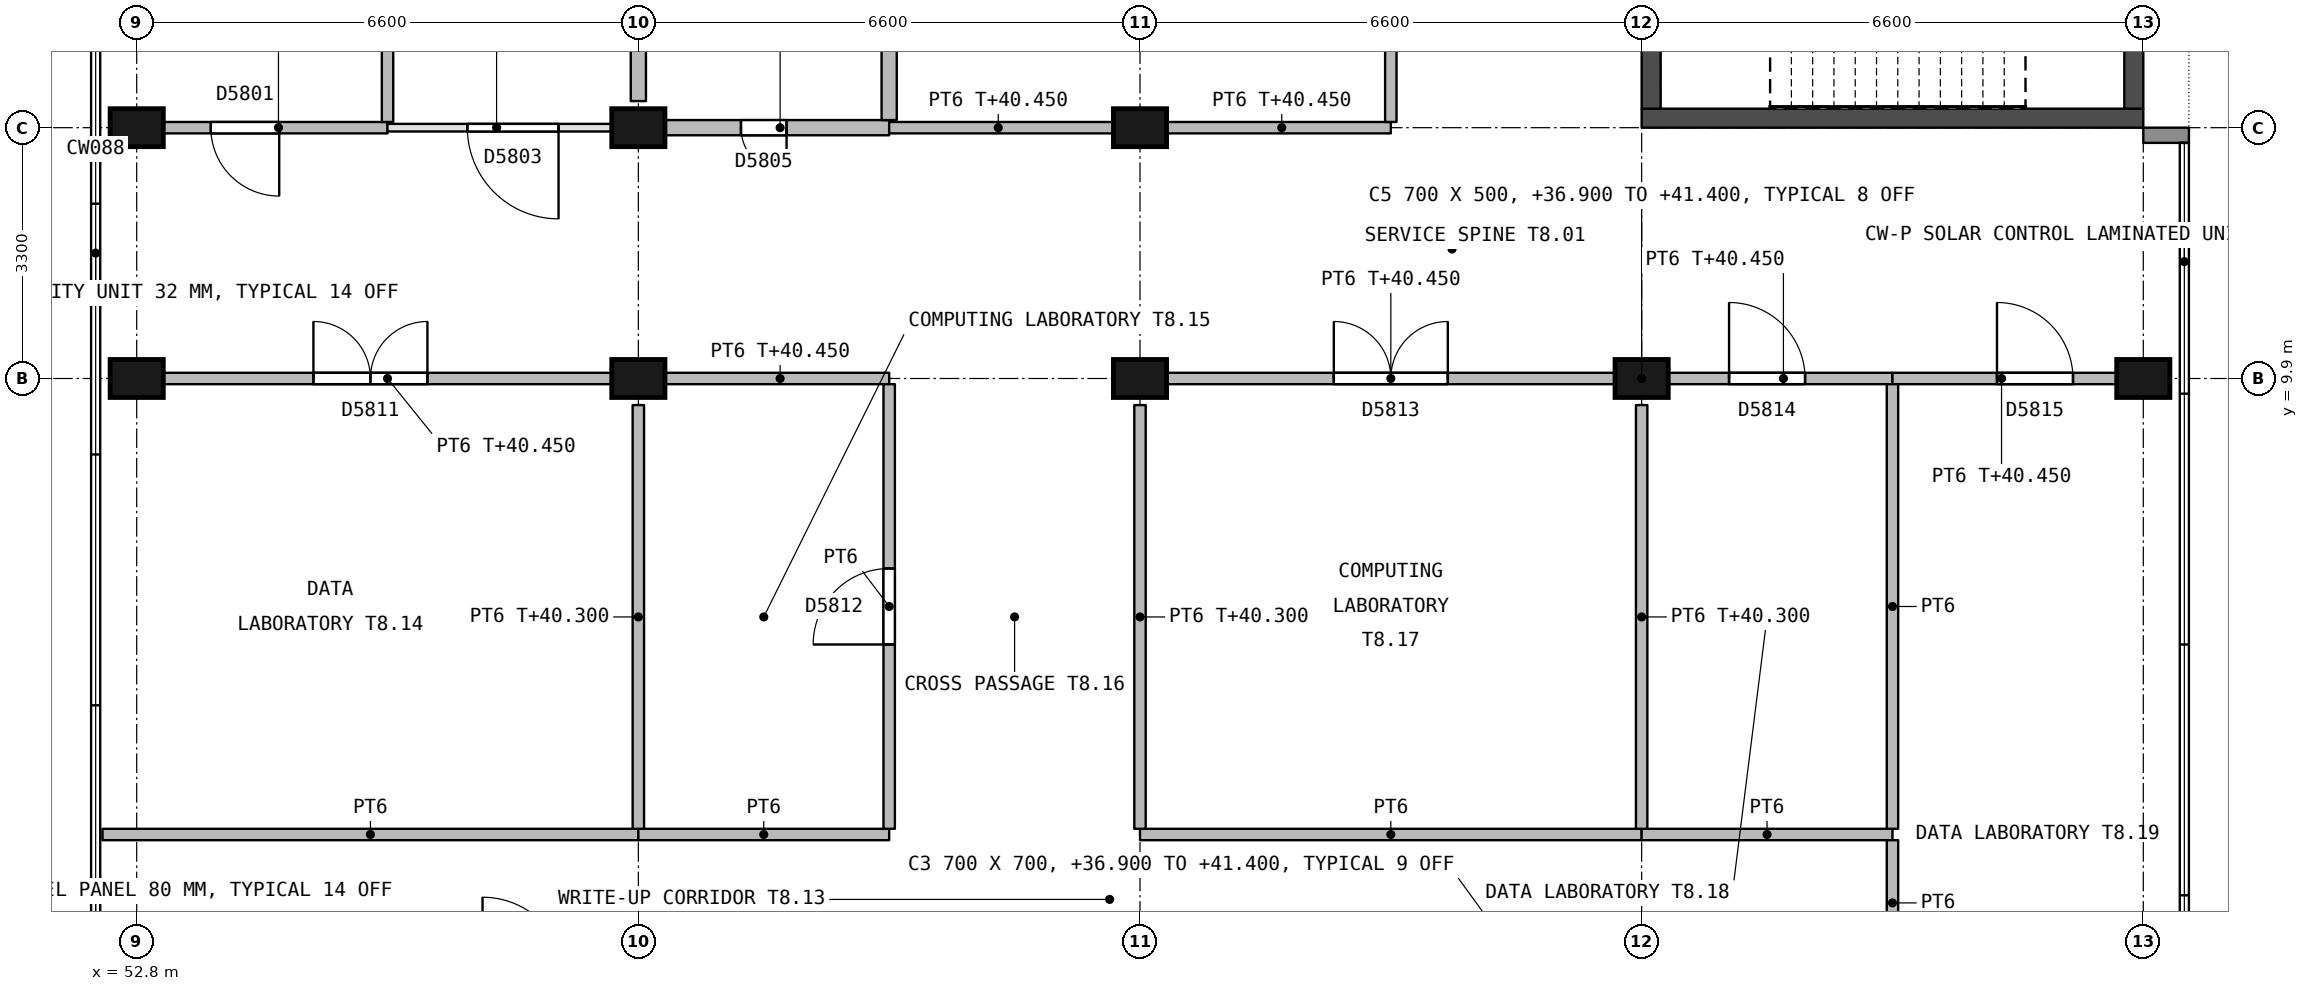
"""IFC4 building model, lengths in metres.
Left out: names, types, materials, properties, quantities, classifications, styles, units other than length and angle.
Written with IfcOpenShell. Run it as: python <this file> out.ifc"""

import sys

from ifc_helpers import new_model, si_unit, direction, frame, frame_2d, origin, origin_2d, place, context, subcontext, project, spatial, rectangle, extrude, element, fill, save


model = new_model("IFC4")
c1 = context("Model", 3, precision=1e-05, world=origin(), true_north=direction((0.0, 1.0)))
c2 = subcontext(c1, "Body", "Model", "MODEL_VIEW")
j1 = project(units=[si_unit("LENGTHUNIT", "METRE"), si_unit("PLANEANGLEUNIT", "RADIAN")], contexts=[c1])
p1 = place(None, origin())
s1 = spatial("IfcSite", under=j1, at=p1, CompositionType="ELEMENT")
p2 = place(p1, origin())
s2 = spatial("IfcBuilding", under=s1, at=p2, CompositionType="ELEMENT")
p3 = place(p2, frame((0.0, 0.0, 36.9)))
s3 = spatial("IfcBuildingStorey", under=s2, at=p3, CompositionType="ELEMENT", Elevation=36.9)
for number, where, z_axis, x_axis in (
    (1, (52.8, 9.9, 0.0), (0.0, 0.0, 1.0), (1.0, 0.0, 0.0)),
    (2, (52.8, 13.2, 0.0), (0.0, 0.0, 1.0), (1.0, 0.0, 0.0)),
    (3, (59.4, 9.9, 0.0), (0.0, 0.0, 1.0), (1.0, 0.0, 0.0)),
    (4, (59.4, 13.2, 0.0), (0.0, 0.0, 1.0), (1.0, 0.0, 0.0)),
    (5, (66.0, 9.9, 0.0), (0.0, 0.0, 1.0), (1.0, 0.0, 0.0)),
    (6, (66.0, 13.2, 0.0), (0.0, 0.0, 1.0), (1.0, 0.0, 0.0)),
    (7, (72.6, 9.9, 0.0), (0.0, 0.0, 1.0), (1.0, 0.0, 0.0)),
    (8, (79.2, 9.9, 0.0), (0.0, 0.0, 1.0), (1.0, 0.0, 0.0)),
):
    element("IfcColumn", number, at=place(p3, frame(where, z_axis=z_axis, x_axis=x_axis)), inside=s3, PredefinedType="COLUMN", context=c2, shape_type="SweptSolid", body=[
        extrude(rectangle(XDim=0.7, YDim=0.5, at=origin_2d()), origin(), (0.0, 0.0, 1.0), 4.5),
    ])
p4 = place(p3, frame((72.6, 13.325, 0.0), z_axis=(0.0, 0.0, 1.0), x_axis=(1.0, 0.0, 0.0)))
e9 = element("IfcWall", 9, at=p4, inside=s3, PredefinedType="SHEAR", context=c2, shape_type="SweptSolid", body=[
    extrude(rectangle(XDim=6.6, YDim=0.25, at=frame_2d((3.3, 0.0))), origin(), (0.0, 0.0, 1.0), 4.2),
])
p5 = place(p3, frame((72.725, 13.45, 0.0), z_axis=(0.0, 0.0, 1.0), x_axis=(0.0, 1.0, 0.0)))
e10 = element("IfcWall", 10, at=p5, inside=s3, PredefinedType="SHEAR", context=c2, shape_type="SweptSolid", body=[
    extrude(rectangle(XDim=9.4, YDim=0.25, at=frame_2d((4.7, 0.0))), origin(), (0.0, 0.0, 1.0), 4.2),
])
p6 = place(p5, frame((4.125, 0.0, 0.0)))
e11 = element("IfcOpeningElement", 11, at=p6, cuts=e10, PredefinedType="OPENING", context=c2, shape_type="SweptSolid", body=[
    extrude(rectangle(XDim=1.2, YDim=2.1, at=frame_2d((0.6, 1.05))), frame((0.0, 0.135, 0.0), z_axis=(0.0, -1.0, 0.0), x_axis=(1.0, 0.0, 0.0)), (0.0, 0.0, 1.0), 0.27),
])
p7 = place(p3, frame((79.075, 13.45, 0.0), z_axis=(0.0, 0.0, 1.0), x_axis=(0.0, 1.0, 0.0)))
e12 = element("IfcWall", 12, at=p7, inside=s3, PredefinedType="SHEAR", context=c2, shape_type="SweptSolid", body=[
    extrude(rectangle(XDim=9.4, YDim=0.25, at=frame_2d((4.7, 0.0))), origin(), (0.0, 0.0, 1.0), 4.2),
])
p8 = place(p7, frame((0.95, 0.0, 0.7)))
e13 = element("IfcOpeningElement", 13, at=p8, cuts=e12, PredefinedType="OPENING", context=c2, shape_type="SweptSolid", body=[
    extrude(rectangle(XDim=1.2, YDim=1.8, at=frame_2d((0.6, 0.9))), frame((0.0, 0.135, 0.0), z_axis=(0.0, -1.0, 0.0), x_axis=(1.0, 0.0, 0.0)), (0.0, 0.0, 1.0), 0.27),
])
p9 = place(p3, frame((79.2, 13.1, 0.0), z_axis=(0.0, 0.0, 1.0), x_axis=(1.0, 0.0, 0.0)))
e14 = element("IfcWall", 14, at=p9, inside=s3, PredefinedType="STANDARD", context=c2, shape_type="SweptSolid", body=[
    extrude(rectangle(XDim=0.6, YDim=0.2, at=frame_2d((0.3, 0.0))), origin(), (0.0, 0.0, 1.0), 3.55),
])
p10 = place(p3, frame((56.1, 13.2, 0.0), z_axis=(0.0, 0.0, 1.0), x_axis=(-1.0, 0.0, 0.0)))
e15 = element("IfcWall", 15, at=p10, inside=s3, PredefinedType="PARTITIONING", context=c2, shape_type="SweptSolid", body=[
    extrude(rectangle(XDim=2.95, YDim=0.15, at=frame_2d((1.475, 0.0))), origin(), (0.0, 0.0, 1.0), 3.55),
])
p11 = place(p10, frame((1.425, 0.0, 0.0)))
e16 = element("IfcOpeningElement", 16, at=p11, cuts=e15, PredefinedType="OPENING", context=c2, shape_type="SweptSolid", body=[
    extrude(rectangle(XDim=0.9, YDim=2.1, at=frame_2d((0.45, 1.05))), frame((0.0, 0.085, 0.0), z_axis=(0.0, -1.0, 0.0), x_axis=(1.0, 0.0, 0.0)), (0.0, 0.0, 1.0), 0.17),
])
p12 = place(p3, frame((56.1, 13.2, 0.0), z_axis=(0.0, 0.0, 1.0), x_axis=(1.0, 0.0, 0.0)))
e17 = element("IfcWall", 17, at=p12, inside=s3, PredefinedType="PARTITIONING", context=c2, shape_type="SweptSolid", body=[
    extrude(rectangle(XDim=2.95, YDim=0.1, at=frame_2d((1.475, 0.0))), origin(), (0.0, 0.0, 1.0), 3.55),
])
p13 = place(p12, frame((1.05, 0.0, 0.0)))
e18 = element("IfcOpeningElement", 18, at=p13, cuts=e17, PredefinedType="OPENING", context=c2, shape_type="SweptSolid", body=[
    extrude(rectangle(XDim=1.2, YDim=2.1, at=frame_2d((0.6, 1.05))), frame((0.0, 0.06, 0.0), z_axis=(0.0, -1.0, 0.0), x_axis=(1.0, 0.0, 0.0)), (0.0, 0.0, 1.0), 0.12),
])
p14 = place(p3, frame((59.75, 13.2, 0.0), z_axis=(0.0, 0.0, 1.0), x_axis=(1.0, 0.0, 0.0)))
e19 = element("IfcWall", 19, at=p14, inside=s3, PredefinedType="PARTITIONING", context=c2, shape_type="SweptSolid", body=[
    extrude(rectangle(XDim=2.95, YDim=0.2, at=frame_2d((1.475, 0.0))), origin(), (0.0, 0.0, 1.0), 3.55),
])
p15 = place(p14, frame((1.0, 0.0, 0.0)))
e20 = element("IfcOpeningElement", 20, at=p15, cuts=e19, PredefinedType="OPENING", context=c2, shape_type="SweptSolid", body=[
    extrude(rectangle(XDim=0.6, YDim=2.1, at=frame_2d((0.3, 1.05))), frame((0.0, 0.11, 0.0), z_axis=(0.0, -1.0, 0.0), x_axis=(1.0, 0.0, 0.0)), (0.0, 0.0, 1.0), 0.22),
])
for number, where, z_axis, x_axis in (
    (21, (69.3, 13.2, 0.0), (0.0, 0.0, 1.0), (-1.0, 0.0, 0.0)),
    (22, (65.65, 13.2, 0.0), (0.0, 0.0, 1.0), (-1.0, 0.0, 0.0)),
):
    element("IfcWall", number, at=place(p3, frame(where, z_axis=z_axis, x_axis=x_axis)), inside=s3, PredefinedType="PARTITIONING", context=c2, shape_type="SweptSolid", body=[
        extrude(rectangle(XDim=2.95, YDim=0.15, at=frame_2d((1.475, 0.0))), origin(), (0.0, 0.0, 1.0), 3.55),
    ])
p16 = place(p3, frame((53.15, 9.9, 0.0), z_axis=(0.0, 0.0, 1.0), x_axis=(1.0, 0.0, 0.0)))
e23 = element("IfcWall", 23, at=p16, inside=s3, PredefinedType="PARTITIONING", context=c2, shape_type="SweptSolid", body=[
    extrude(rectangle(XDim=5.9, YDim=0.15, at=frame_2d((2.95, 0.0))), origin(), (0.0, 0.0, 1.0), 3.55),
])
p17 = place(p16, frame((1.975, 0.0, 0.0)))
e24 = element("IfcOpeningElement", 24, at=p17, cuts=e23, PredefinedType="OPENING", context=c2, shape_type="SweptSolid", body=[
    extrude(rectangle(XDim=1.5, YDim=2.1, at=frame_2d((0.75, 1.05))), frame((0.0, 0.085, 0.0), z_axis=(0.0, -1.0, 0.0), x_axis=(1.0, 0.0, 0.0)), (0.0, 0.0, 1.0), 0.17),
])
p18 = place(p3, frame((59.75, 9.9, 0.0), z_axis=(0.0, 0.0, 1.0), x_axis=(1.0, 0.0, 0.0)))
e25 = element("IfcWall", 25, at=p18, inside=s3, PredefinedType="PARTITIONING", context=c2, shape_type="SweptSolid", body=[
    extrude(rectangle(XDim=2.95, YDim=0.15, at=frame_2d((1.475, 0.0))), origin(), (0.0, 0.0, 1.0), 3.55),
])
p19 = place(p3, frame((66.35, 9.9, 0.0), z_axis=(0.0, 0.0, 1.0), x_axis=(1.0, 0.0, 0.0)))
e26 = element("IfcWall", 26, at=p19, inside=s3, PredefinedType="PARTITIONING", context=c2, shape_type="SweptSolid", body=[
    extrude(rectangle(XDim=5.9, YDim=0.15, at=frame_2d((2.95, 0.0))), origin(), (0.0, 0.0, 1.0), 3.55),
])
p20 = place(p19, frame((2.2, 0.0, 0.0)))
e27 = element("IfcOpeningElement", 27, at=p20, cuts=e26, PredefinedType="OPENING", context=c2, shape_type="SweptSolid", body=[
    extrude(rectangle(XDim=1.5, YDim=2.1, at=frame_2d((0.75, 1.05))), frame((0.0, 0.085, 0.0), z_axis=(0.0, -1.0, 0.0), x_axis=(1.0, 0.0, 0.0)), (0.0, 0.0, 1.0), 0.17),
])
p21 = place(p3, frame((72.95, 9.9, 0.0), z_axis=(0.0, 0.0, 1.0), x_axis=(1.0, 0.0, 0.0)))
e28 = element("IfcWall", 28, at=p21, inside=s3, PredefinedType="PARTITIONING", context=c2, shape_type="SweptSolid", body=[
    extrude(rectangle(XDim=2.95, YDim=0.15, at=frame_2d((1.475, 0.0))), origin(), (0.0, 0.0, 1.0), 3.55),
])
p22 = place(p21, frame((0.8, 0.0, 0.0)))
e29 = element("IfcOpeningElement", 29, at=p22, cuts=e28, PredefinedType="OPENING", context=c2, shape_type="SweptSolid", body=[
    extrude(rectangle(XDim=1.0, YDim=2.1, at=frame_2d((0.5, 1.05))), frame((0.0, 0.085, 0.0), z_axis=(0.0, -1.0, 0.0), x_axis=(1.0, 0.0, 0.0)), (0.0, 0.0, 1.0), 0.17),
])
p23 = place(p3, frame((75.9, 9.9, 0.0), z_axis=(0.0, 0.0, 1.0), x_axis=(1.0, 0.0, 0.0)))
e30 = element("IfcWall", 30, at=p23, inside=s3, PredefinedType="PARTITIONING", context=c2, shape_type="SweptSolid", body=[
    extrude(rectangle(XDim=2.95, YDim=0.15, at=frame_2d((1.475, 0.0))), origin(), (0.0, 0.0, 1.0), 3.55),
])
p24 = place(p23, frame((1.375, 0.0, 0.0)))
e31 = element("IfcOpeningElement", 31, at=p24, cuts=e30, PredefinedType="OPENING", context=c2, shape_type="SweptSolid", body=[
    extrude(rectangle(XDim=1.0, YDim=2.1, at=frame_2d((0.5, 1.05))), frame((0.0, 0.085, 0.0), z_axis=(0.0, -1.0, 0.0), x_axis=(1.0, 0.0, 0.0)), (0.0, 0.0, 1.0), 0.17),
])
p25 = place(p3, frame((56.1, 13.275, 0.0), z_axis=(0.0, 0.0, 1.0), x_axis=(0.0, 1.0, 0.0)))
e32 = element("IfcWall", 32, at=p25, inside=s3, PredefinedType="PARTITIONING", context=c2, shape_type="SweptSolid", body=[
    extrude(rectangle(XDim=3.15, YDim=0.15, at=frame_2d((1.575, 0.0))), origin(), (0.0, 0.0, 1.0), 4.2),
])
p26 = place(p3, frame((59.4, 13.55, 0.0), z_axis=(0.0, 0.0, 1.0), x_axis=(0.0, 1.0, 0.0)))
e33 = element("IfcWall", 33, at=p26, inside=s3, PredefinedType="PARTITIONING", context=c2, shape_type="SweptSolid", body=[
    extrude(rectangle(XDim=2.95, YDim=0.2, at=frame_2d((1.475, 0.0))), origin(), (0.0, 0.0, 1.0), 3.4),
])
p27 = place(p3, frame((62.7, 13.3, 0.0), z_axis=(0.0, 0.0, 1.0), x_axis=(0.0, 1.0, 0.0)))
e34 = element("IfcWall", 34, at=p27, inside=s3, PredefinedType="PARTITIONING", context=c2, shape_type="SweptSolid", body=[
    extrude(rectangle(XDim=3.1, YDim=0.2, at=frame_2d((1.55, 0.0))), origin(), (0.0, 0.0, 1.0), 4.2),
])
p28 = place(p3, frame((69.3, 23.55, 0.0), z_axis=(0.0, 0.0, 1.0), x_axis=(0.0, -1.0, 0.0)))
e35 = element("IfcWall", 35, at=p28, inside=s3, PredefinedType="PARTITIONING", context=c2, shape_type="SweptSolid", body=[
    extrude(rectangle(XDim=10.275, YDim=0.15, at=frame_2d((5.138, 0.0))), origin(), (0.0, 0.0, 1.0), 4.2),
])
p29 = place(p28, frame((4.275, 0.0, 0.0)))
e36 = element("IfcOpeningElement", 36, at=p29, cuts=e35, PredefinedType="OPENING", context=c2, shape_type="SweptSolid", body=[
    extrude(rectangle(XDim=1.8, YDim=2.4, at=frame_2d((0.9, 1.2))), frame((0.0, 0.085, 0.0), z_axis=(0.0, -1.0, 0.0), x_axis=(1.0, 0.0, 0.0)), (0.0, 0.0, 1.0), 0.17),
])
p30 = place(p3, frame((59.4, 3.9, 0.0), z_axis=(0.0, 0.0, 1.0), x_axis=(-1.0, 0.0, 0.0)))
e37 = element("IfcWall", 37, at=p30, inside=s3, PredefinedType="PARTITIONING", context=c2, shape_type="SweptSolid", body=[
    extrude(rectangle(XDim=7.05, YDim=0.15, at=frame_2d((3.525, 0.0))), origin(), (0.0, 0.0, 1.0), 4.2),
])
p31 = place(p3, frame((62.7, 3.9, 0.0), z_axis=(0.0, 0.0, 1.0), x_axis=(-1.0, 0.0, 0.0)))
e38 = element("IfcWall", 38, at=p31, inside=s3, PredefinedType="PARTITIONING", context=c2, shape_type="SweptSolid", body=[
    extrude(rectangle(XDim=3.3, YDim=0.15, at=frame_2d((1.65, 0.0))), origin(), (0.0, 0.0, 1.0), 4.2),
])
p32 = place(p3, frame((72.6, 3.9, 0.0), z_axis=(0.0, 0.0, 1.0), x_axis=(-1.0, 0.0, 0.0)))
e39 = element("IfcWall", 39, at=p32, inside=s3, PredefinedType="PARTITIONING", context=c2, shape_type="SweptSolid", body=[
    extrude(rectangle(XDim=6.6, YDim=0.15, at=frame_2d((3.3, 0.0))), origin(), (0.0, 0.0, 1.0), 4.2),
])
p33 = place(p3, frame((75.9, 3.9, 0.0), z_axis=(0.0, 0.0, 1.0), x_axis=(-1.0, 0.0, 0.0)))
e40 = element("IfcWall", 40, at=p33, inside=s3, PredefinedType="PARTITIONING", context=c2, shape_type="SweptSolid", body=[
    extrude(rectangle(XDim=3.3, YDim=0.15, at=frame_2d((1.65, 0.0))), origin(), (0.0, 0.0, 1.0), 4.2),
])
p34 = place(p3, frame((75.9, 2.175, 0.0), z_axis=(0.0, 0.0, 1.0), x_axis=(0.0, 1.0, 0.0)))
e41 = element("IfcWall", 41, at=p34, inside=s3, PredefinedType="PARTITIONING", context=c2, shape_type="SweptSolid", body=[
    extrude(rectangle(XDim=1.65, YDim=0.15, at=frame_2d((0.825, 0.0))), origin(), (0.0, 0.0, 1.0), 4.2),
])
p35 = place(p3, frame((59.4, 3.975, 0.0), z_axis=(0.0, 0.0, 1.0), x_axis=(0.0, 1.0, 0.0)))
e42 = element("IfcWall", 42, at=p35, inside=s3, PredefinedType="PARTITIONING", context=c2, shape_type="SweptSolid", body=[
    extrude(rectangle(XDim=5.575, YDim=0.15, at=frame_2d((2.788, 0.0))), origin(), (0.0, 0.0, 1.0), 3.4),
])
p36 = place(p3, frame((62.7, 9.825, 0.0), z_axis=(0.0, 0.0, 1.0), x_axis=(0.0, -1.0, 0.0)))
e43 = element("IfcWall", 43, at=p36, inside=s3, PredefinedType="PARTITIONING", context=c2, shape_type="SweptSolid", body=[
    extrude(rectangle(XDim=5.85, YDim=0.15, at=frame_2d((2.925, 0.0))), origin(), (0.0, 0.0, 1.0), 4.2),
])
p37 = place(p36, frame((2.425, 0.0, 0.0)))
e44 = element("IfcOpeningElement", 44, at=p37, cuts=e43, PredefinedType="OPENING", context=c2, shape_type="SweptSolid", body=[
    extrude(rectangle(XDim=1.0, YDim=2.1, at=frame_2d((0.5, 1.05))), frame((0.0, 0.085, 0.0), z_axis=(0.0, -1.0, 0.0), x_axis=(1.0, 0.0, 0.0)), (0.0, 0.0, 1.0), 0.17),
])
for number, where, z_axis, x_axis in (
    (45, (66.0, 3.975, 0.0), (0.0, 0.0, 1.0), (0.0, 1.0, 0.0)),
    (46, (72.6, 3.975, 0.0), (0.0, 0.0, 1.0), (0.0, 1.0, 0.0)),
):
    element("IfcWall", number, at=place(p3, frame(where, z_axis=z_axis, x_axis=x_axis)), inside=s3, PredefinedType="PARTITIONING", context=c2, shape_type="SweptSolid", body=[
        extrude(rectangle(XDim=5.575, YDim=0.15, at=frame_2d((2.788, 0.0))), origin(), (0.0, 0.0, 1.0), 3.4),
    ])
p38 = place(p3, frame((75.9, 3.975, 0.0), z_axis=(0.0, 0.0, 1.0), x_axis=(0.0, 1.0, 0.0)))
e47 = element("IfcWall", 47, at=p38, inside=s3, PredefinedType="PARTITIONING", context=c2, shape_type="SweptSolid", body=[
    extrude(rectangle(XDim=5.85, YDim=0.15, at=frame_2d((2.925, 0.0))), origin(), (0.0, 0.0, 1.0), 4.2),
])
p39 = place(p11, origin())
e48 = element("IfcDoor", 48, at=p39, inside=s3, OperationType="SINGLE_SWING_LEFT", PredefinedType="DOOR", context=c2, shape_type="SweptSolid", body=[
    extrude(rectangle(XDim=0.9, YDim=2.1, at=frame_2d((0.45, 1.05))), frame((0.0, 0.027, 0.0), z_axis=(0.0, -1.0, 0.0), x_axis=(1.0, 0.0, 0.0)), (0.0, 0.0, 1.0), 0.054),
])
fill(e16, e48)
p40 = place(p13, origin())
e49 = element("IfcDoor", 49, at=p40, inside=s3, OperationType="SINGLE_SWING_RIGHT", PredefinedType="DOOR", context=c2, shape_type="SweptSolid", body=[
    extrude(rectangle(XDim=1.2, YDim=2.1, at=frame_2d((0.6, 1.05))), frame((0.0, 0.022, 0.0), z_axis=(0.0, -1.0, 0.0), x_axis=(1.0, 0.0, 0.0)), (0.0, 0.0, 1.0), 0.044),
])
fill(e18, e49)
p41 = place(p15, origin())
e50 = element("IfcDoor", 50, at=p41, inside=s3, OperationType="SINGLE_SWING_RIGHT", PredefinedType="DOOR", context=c2, shape_type="SweptSolid", body=[
    extrude(rectangle(XDim=0.6, YDim=2.1, at=frame_2d((0.3, 1.05))), frame((0.0, 0.03, 0.0), z_axis=(0.0, -1.0, 0.0), x_axis=(1.0, 0.0, 0.0)), (0.0, 0.0, 1.0), 0.06),
])
fill(e20, e50)
p42 = place(p17, origin())
e51 = element("IfcDoor", 51, at=p42, inside=s3, OperationType="DOUBLE_DOOR_SINGLE_SWING", PredefinedType="DOOR", context=c2, shape_type="SweptSolid", body=[
    extrude(rectangle(XDim=1.5, YDim=2.1, at=frame_2d((0.75, 1.05))), frame((0.0, 0.027, 0.0), z_axis=(0.0, -1.0, 0.0), x_axis=(1.0, 0.0, 0.0)), (0.0, 0.0, 1.0), 0.054),
])
fill(e24, e51)
p43 = place(p37, origin())
e52 = element("IfcDoor", 52, at=p43, inside=s3, OperationType="SINGLE_SWING_RIGHT", PredefinedType="DOOR", context=c2, shape_type="SweptSolid", body=[
    extrude(rectangle(XDim=1.0, YDim=2.1, at=frame_2d((0.5, 1.05))), frame((0.0, 0.027, 0.0), z_axis=(0.0, -1.0, 0.0), x_axis=(1.0, 0.0, 0.0)), (0.0, 0.0, 1.0), 0.054),
])
fill(e44, e52)
p44 = place(p20, origin())
e53 = element("IfcDoor", 53, at=p44, inside=s3, OperationType="DOUBLE_DOOR_SINGLE_SWING", PredefinedType="DOOR", context=c2, shape_type="SweptSolid", body=[
    extrude(rectangle(XDim=1.5, YDim=2.1, at=frame_2d((0.75, 1.05))), frame((0.0, 0.027, 0.0), z_axis=(0.0, -1.0, 0.0), x_axis=(1.0, 0.0, 0.0)), (0.0, 0.0, 1.0), 0.054),
])
fill(e27, e53)
p45 = place(p22, origin())
e54 = element("IfcDoor", 54, at=p45, inside=s3, OperationType="SINGLE_SWING_LEFT", PredefinedType="DOOR", context=c2, shape_type="SweptSolid", body=[
    extrude(rectangle(XDim=1.0, YDim=2.1, at=frame_2d((0.5, 1.05))), frame((0.0, 0.027, 0.0), z_axis=(0.0, -1.0, 0.0), x_axis=(1.0, 0.0, 0.0)), (0.0, 0.0, 1.0), 0.054),
])
fill(e29, e54)
p46 = place(p24, origin())
e55 = element("IfcDoor", 55, at=p46, inside=s3, OperationType="SINGLE_SWING_LEFT", PredefinedType="DOOR", context=c2, shape_type="SweptSolid", body=[
    extrude(rectangle(XDim=1.0, YDim=2.1, at=frame_2d((0.5, 1.05))), frame((0.0, 0.027, 0.0), z_axis=(0.0, -1.0, 0.0), x_axis=(1.0, 0.0, 0.0)), (0.0, 0.0, 1.0), 0.054),
])
fill(e31, e55)
save(model, sys.argv[1])
